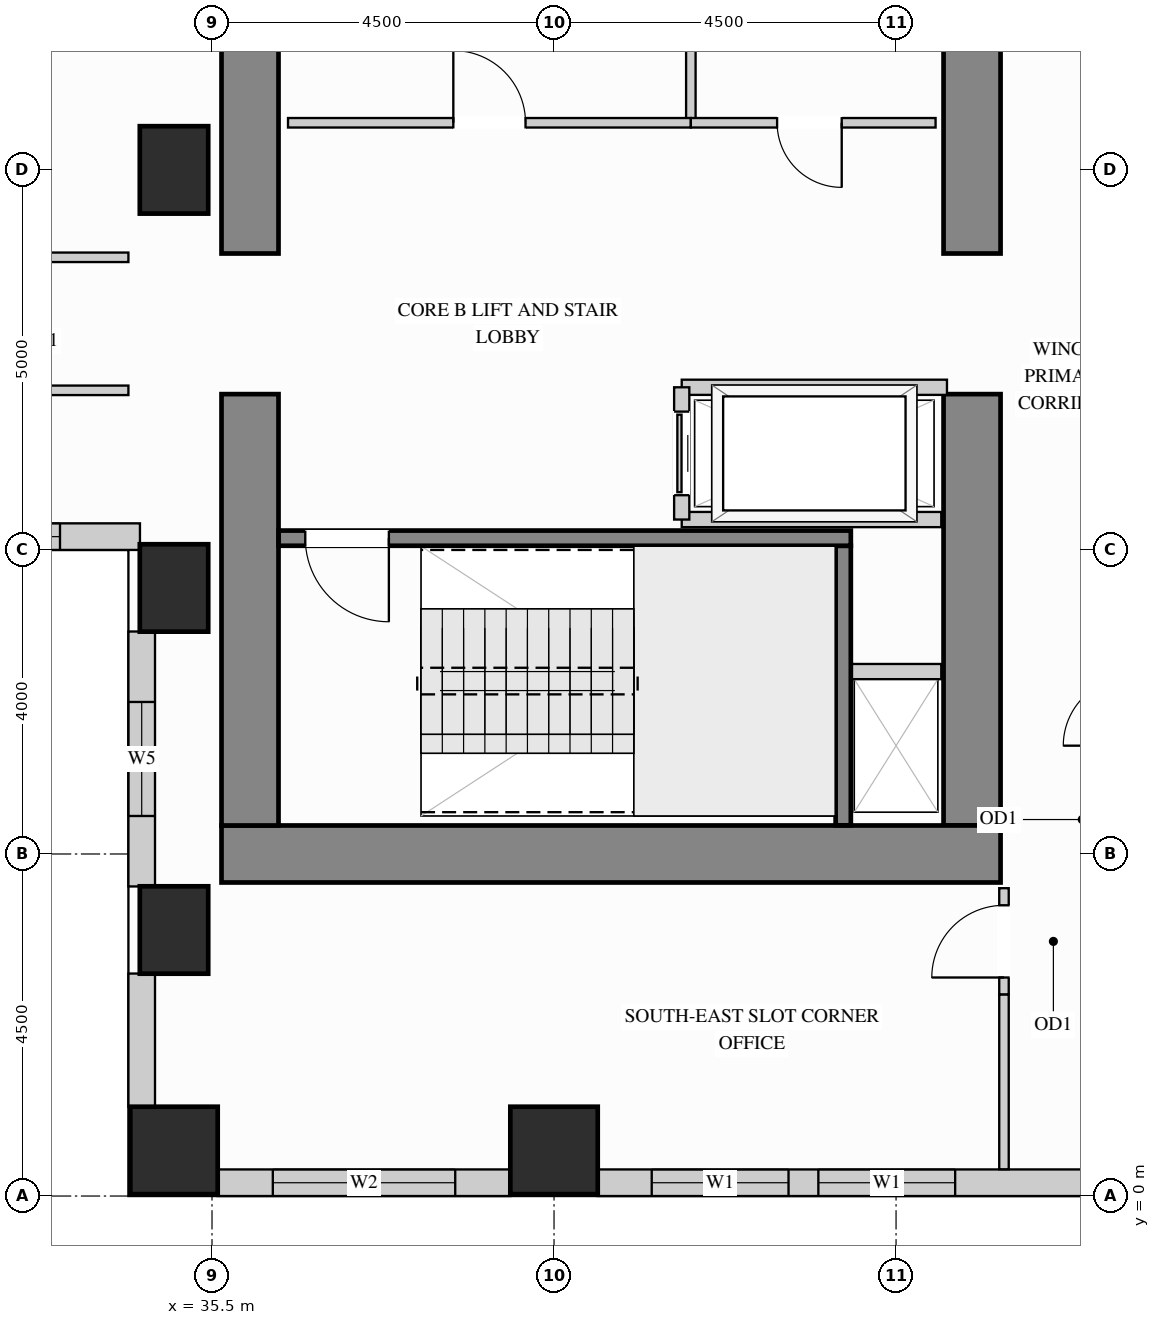
"""IFC4 building model, lengths in metres.
Left out: names, types, materials, properties, quantities, classifications, styles, units other than length and angle.
Written with IfcOpenShell. Run it as: python <this file> out.ifc"""

import sys

from ifc_helpers import new_model, si_unit, direction, frame, frame_2d, origin, origin_2d, place, context, subcontext, project, spatial, rectangle, extrude, source, transform, mapped, element, fill, save


model = new_model("IFC4")
c1 = context("Model", 3, precision=1e-05, world=origin(), true_north=direction((0.0, 1.0)))
c2 = subcontext(c1, "Body", "Model", "MODEL_VIEW")
j1 = project(units=[si_unit("LENGTHUNIT", "METRE"), si_unit("PLANEANGLEUNIT", "RADIAN")], contexts=[c1])
p1 = place(None, origin())
s1 = spatial("IfcSite", under=j1, at=p1, CompositionType="ELEMENT")
p2 = place(p1, origin())
s2 = spatial("IfcBuilding", under=s1, at=p2, CompositionType="ELEMENT")
p3 = place(p2, frame((0.0, 0.0, 120.6)))
s3 = spatial("IfcBuildingStorey", under=s2, at=p3, CompositionType="ELEMENT", Elevation=120.6)
m1 = source(origin(), c2, "Body", "SweptSolid", [
    extrude(rectangle(XDim=0.9, YDim=1.15, at=origin_2d()), origin(), (0.0, 0.0, 1.0), 3.38),
])
for number, where, z_axis, x_axis in (
    (1, (35.0, 13.5, 0.0), (0.0, 0.0, 1.0), (1.0, 0.0, 0.0)),
    (2, (35.0, 3.5, 0.0), (0.0, 0.0, 1.0), (1.0, 0.0, 0.0)),
    (3, (35.0, 8.0, 0.0), (0.0, 0.0, 1.0), (1.0, 0.0, 0.0)),
):
    element("IfcColumn", number, at=place(p3, frame(where, z_axis=z_axis, x_axis=x_axis)), inside=s3, PredefinedType="COLUMN", context=c2, shape_type="MappedRepresentation", body=[
        mapped(m1, transform((0.0, 0.0, 0.0), x_axis=(1.0, 0.0, 0.0), y_axis=(0.0, 1.0, 0.0), z_axis=(0.0, 0.0, 1.0))),
    ])
m2 = source(origin(), c2, "Body", "SweptSolid", [
    extrude(rectangle(XDim=1.15, YDim=1.15, at=origin_2d()), origin(), (0.0, 0.0, 1.0), 3.38),
])
for number, where, z_axis, x_axis in (
    (4, (35.0, 0.6, 0.0), (0.0, 0.0, 1.0), (1.0, 0.0, 0.0)),
    (5, (40.0, 0.6, 0.0), (0.0, 0.0, 1.0), (1.0, 0.0, 0.0)),
):
    element("IfcColumn", number, at=place(p3, frame(where, z_axis=z_axis, x_axis=x_axis)), inside=s3, PredefinedType="COLUMN", context=c2, shape_type="MappedRepresentation", body=[
        mapped(m2, transform((0.0, 0.0, 0.0), x_axis=(1.0, 0.0, 0.0), y_axis=(0.0, 1.0, 0.0), z_axis=(0.0, 0.0, 1.0))),
    ])
m3 = source(origin(), c2, "Body", "SweptSolid", [
    extrude(rectangle(XDim=5.675, YDim=0.75, at=frame_2d((2.837, 0.0))), origin(), (0.0, 0.0, 1.0), 3.38),
])
p4 = place(p3, frame((45.5, 4.875, 0.0), z_axis=(0.0, 0.0, 1.0), x_axis=(0.0, 1.0, 0.0)))
e6 = element("IfcWall", 6, at=p4, inside=s3, PredefinedType="SHEAR", context=c2, shape_type="MappedRepresentation", body=[
    mapped(m3, transform((0.0, 0.0, 0.0), x_axis=(1.0, 0.0, 0.0), y_axis=(0.0, 1.0, 0.0), z_axis=(0.0, 0.0, 1.0))),
])
m4 = source(origin(), c2, "Body", "SweptSolid", [
    extrude(rectangle(XDim=3.725, YDim=0.75, at=frame_2d((1.863, 0.0))), origin(), (0.0, 0.0, 1.0), 3.38),
])
p5 = place(p3, frame((45.5, 12.4, 0.0), z_axis=(0.0, 0.0, 1.0), x_axis=(0.0, 1.0, 0.0)))
e7 = element("IfcWall", 7, at=p5, inside=s3, PredefinedType="SHEAR", context=c2, shape_type="MappedRepresentation", body=[
    mapped(m4, transform((0.0, 0.0, 0.0), x_axis=(1.0, 0.0, 0.0), y_axis=(0.0, 1.0, 0.0), z_axis=(0.0, 0.0, 1.0))),
])
m5 = source(origin(), c2, "Body", "SweptSolid", [
    extrude(rectangle(XDim=10.25, YDim=0.75, at=frame_2d((5.125, 0.0))), origin(), (0.0, 0.0, 1.0), 3.38),
])
p6 = place(p3, frame((35.625, 4.5, 0.0), z_axis=(0.0, 0.0, 1.0), x_axis=(1.0, 0.0, 0.0)))
e8 = element("IfcWall", 8, at=p6, inside=s3, PredefinedType="SHEAR", context=c2, shape_type="MappedRepresentation", body=[
    mapped(m5, transform((0.0, 0.0, 0.0), x_axis=(1.0, 0.0, 0.0), y_axis=(0.0, 1.0, 0.0), z_axis=(0.0, 0.0, 1.0))),
])
p7 = place(p3, frame((36.0, 4.875, 0.0), z_axis=(0.0, 0.0, 1.0), x_axis=(0.0, 1.0, 0.0)))
e9 = element("IfcWall", 9, at=p7, inside=s3, PredefinedType="SHEAR", context=c2, shape_type="MappedRepresentation", body=[
    mapped(m3, transform((0.0, 0.0, 0.0), x_axis=(1.0, 0.0, 0.0), y_axis=(0.0, 1.0, 0.0), z_axis=(0.0, 0.0, 1.0))),
])
p8 = place(p3, frame((36.0, 12.4, 0.0), z_axis=(0.0, 0.0, 1.0), x_axis=(0.0, 1.0, 0.0)))
e10 = element("IfcWall", 10, at=p8, inside=s3, PredefinedType="SHEAR", context=c2, shape_type="MappedRepresentation", body=[
    mapped(m4, transform((0.0, 0.0, 0.0), x_axis=(1.0, 0.0, 0.0), y_axis=(0.0, 1.0, 0.0), z_axis=(0.0, 0.0, 1.0))),
])
p9 = place(p3, frame((30.948, 8.675, 0.0), z_axis=(0.0, 0.0, 1.0), x_axis=(1.0, 0.0, 0.0)))
e11 = element("IfcWall", 11, at=p9, inside=s3, PredefinedType="SOLIDWALL", context=c2, shape_type="SweptSolid", body=[
    extrude(rectangle(XDim=3.604, YDim=0.35, at=frame_2d((1.802, 0.0))), origin(), (0.0, 0.0, 1.0), 3.365),
])
p10 = place(p9, frame((1.052, 0.0, 0.78)))
e12 = element("IfcOpeningElement", 12, at=p10, cuts=e11, PredefinedType="OPENING", context=c2, shape_type="SweptSolid", body=[
    extrude(rectangle(XDim=1.5, YDim=2.0, at=frame_2d((0.75, 1.0))), frame((0.0, 0.185, 0.0), z_axis=(0.0, -1.0, 0.0), x_axis=(1.0, 0.0, 0.0)), (0.0, 0.0, 1.0), 0.37),
])
p11 = place(p3, frame((34.575, 7.427, 0.0), z_axis=(0.0, 0.0, 1.0), x_axis=(0.0, -1.0, 0.0)))
e13 = element("IfcWall", 13, at=p11, inside=s3, PredefinedType="SOLIDWALL", context=c2, shape_type="SweptSolid", body=[
    extrude(rectangle(XDim=3.354, YDim=0.35, at=frame_2d((1.677, 0.0))), origin(), (0.0, 0.0, 1.0), 3.365),
])
p12 = place(p11, frame((0.927, 0.0, 0.78)))
e14 = element("IfcOpeningElement", 14, at=p12, cuts=e13, PredefinedType="OPENING", context=c2, shape_type="SweptSolid", body=[
    extrude(rectangle(XDim=1.5, YDim=2.0, at=frame_2d((0.75, 1.0))), frame((0.0, 0.185, 0.0), z_axis=(0.0, -1.0, 0.0), x_axis=(1.0, 0.0, 0.0)), (0.0, 0.0, 1.0), 0.37),
])
m6 = source(origin(), c2, "Body", "SweptSolid", [
    extrude(rectangle(XDim=1.754, YDim=0.35, at=frame_2d((0.877, 0.0))), origin(), (0.0, 0.0, 1.0), 3.365),
])
p13 = place(p3, frame((34.575, 2.927, 0.0), z_axis=(0.0, 0.0, 1.0), x_axis=(0.0, -1.0, 0.0)))
e15 = element("IfcWall", 15, at=p13, inside=s3, PredefinedType="SOLIDWALL", context=c2, shape_type="MappedRepresentation", body=[
    mapped(m6, transform((0.0, 0.0, 0.0), x_axis=(1.0, 0.0, 0.0), y_axis=(0.0, 1.0, 0.0), z_axis=(0.0, 0.0, 1.0))),
])
p14 = place(p3, frame((35.573, 0.175, 0.0), z_axis=(0.0, 0.0, 1.0), x_axis=(1.0, 0.0, 0.0)))
e16 = element("IfcWall", 16, at=p14, inside=s3, PredefinedType="SOLIDWALL", context=c2, shape_type="SweptSolid", body=[
    extrude(rectangle(XDim=3.854, YDim=0.35, at=frame_2d((1.927, 0.0))), origin(), (0.0, 0.0, 1.0), 3.365),
])
p15 = place(p14, frame((0.727, 0.0, 0.78)))
e17 = element("IfcOpeningElement", 17, at=p15, cuts=e16, PredefinedType="OPENING", context=c2, shape_type="SweptSolid", body=[
    extrude(rectangle(XDim=2.4, YDim=2.1, at=frame_2d((1.2, 1.05))), frame((0.0, 0.185, 0.0), z_axis=(0.0, -1.0, 0.0), x_axis=(1.0, 0.0, 0.0)), (0.0, 0.0, 1.0), 0.37),
])
p16 = place(p3, frame((40.573, 0.175, 0.0), z_axis=(0.0, 0.0, 1.0), x_axis=(1.0, 0.0, 0.0)))
e18 = element("IfcWall", 18, at=p16, inside=s3, PredefinedType="SOLIDWALL", context=c2, shape_type="SweptSolid", body=[
    extrude(rectangle(XDim=6.454, YDim=0.35, at=frame_2d((3.227, 0.0))), origin(), (0.0, 0.0, 1.0), 3.365),
])
p17 = place(p16, frame((0.712, 0.0, 0.78)))
e19 = element("IfcOpeningElement", 19, at=p17, cuts=e18, PredefinedType="OPENING", context=c2, shape_type="SweptSolid", body=[
    extrude(rectangle(XDim=1.8, YDim=2.1, at=frame_2d((0.9, 1.05))), frame((0.0, 0.185, 0.0), z_axis=(0.0, -1.0, 0.0), x_axis=(1.0, 0.0, 0.0)), (0.0, 0.0, 1.0), 0.37),
])
p18 = place(p16, frame((2.905, 0.0, 0.78)))
e20 = element("IfcOpeningElement", 20, at=p18, cuts=e18, PredefinedType="OPENING", context=c2, shape_type="SweptSolid", body=[
    extrude(rectangle(XDim=1.8, YDim=2.1, at=frame_2d((0.9, 1.05))), frame((0.0, 0.185, 0.0), z_axis=(0.0, -1.0, 0.0), x_axis=(1.0, 0.0, 0.0)), (0.0, 0.0, 1.0), 0.37),
])
m7 = source(origin(), c2, "Body", "SweptSolid", [
    extrude(rectangle(XDim=1.93, YDim=0.125, at=frame_2d((0.965, 0.0))), origin(), (0.0, 0.0, 1.0), 3.365),
])
p19 = place(p3, frame((41.8, 14.12, 0.0), z_axis=(0.0, 0.0, 1.0), x_axis=(0.0, 1.0, 0.0)))
e21 = element("IfcWall", 21, at=p19, inside=s3, PredefinedType="PARTITIONING", context=c2, shape_type="MappedRepresentation", body=[
    mapped(m7, transform((0.0, 0.0, 0.0), x_axis=(1.0, 0.0, 0.0), y_axis=(0.0, 1.0, 0.0), z_axis=(0.0, 0.0, 1.0))),
])
p20 = place(p3, frame((36.5, 14.12, 0.0), z_axis=(0.0, 0.0, 1.0), x_axis=(1.0, 0.0, 0.0)))
e22 = element("IfcWall", 22, at=p20, inside=s3, PredefinedType="PARTITIONING", context=c2, shape_type="SweptSolid", body=[
    extrude(rectangle(XDim=5.3, YDim=0.125, at=frame_2d((2.65, 0.0))), origin(), (0.0, 0.0, 1.0), 3.365),
])
p21 = place(p20, frame((2.175, 0.0, 0.0)))
e23 = element("IfcOpeningElement", 23, at=p21, cuts=e22, PredefinedType="OPENING", context=c2, shape_type="SweptSolid", body=[
    extrude(rectangle(XDim=0.95, YDim=2.15, at=frame_2d((0.475, 1.075))), frame((0.0, 0.073, 0.0), z_axis=(0.0, -1.0, 0.0), x_axis=(1.0, 0.0, 0.0)), (0.0, 0.0, 1.0), 0.145),
])
p22 = place(p3, frame((41.8, 14.12, 0.0), z_axis=(0.0, 0.0, 1.0), x_axis=(1.0, 0.0, 0.0)))
e24 = element("IfcWall", 24, at=p22, inside=s3, PredefinedType="PARTITIONING", context=c2, shape_type="SweptSolid", body=[
    extrude(rectangle(XDim=3.22, YDim=0.125, at=frame_2d((1.61, 0.0))), origin(), (0.0, 0.0, 1.0), 3.365),
])
p23 = place(p22, frame((1.135, 0.0, 0.0)))
e25 = element("IfcOpeningElement", 25, at=p23, cuts=e24, PredefinedType="OPENING", context=c2, shape_type="SweptSolid", body=[
    extrude(rectangle(XDim=0.85, YDim=2.1, at=frame_2d((0.425, 1.05))), frame((0.0, 0.073, 0.0), z_axis=(0.0, -1.0, 0.0), x_axis=(1.0, 0.0, 0.0)), (0.0, 0.0, 1.0), 0.145),
])
p24 = place(p3, frame((45.92, 2.65, 0.0), z_axis=(0.0, 0.0, 1.0), x_axis=(0.0, 1.0, 0.0)))
e26 = element("IfcWall", 26, at=p24, inside=s3, PredefinedType="PARTITIONING", context=c2, shape_type="SweptSolid", body=[
    extrude(rectangle(XDim=1.4, YDim=0.125, at=frame_2d((0.7, 0.0))), origin(), (0.0, 0.0, 1.0), 3.365),
])
p25 = place(p24, frame((0.225, 0.0, 0.0)))
e27 = element("IfcOpeningElement", 27, at=p25, cuts=e26, PredefinedType="OPENING", context=c2, shape_type="SweptSolid", body=[
    extrude(rectangle(XDim=0.95, YDim=2.15, at=frame_2d((0.475, 1.075))), frame((0.0, 0.073, 0.0), z_axis=(0.0, -1.0, 0.0), x_axis=(1.0, 0.0, 0.0)), (0.0, 0.0, 1.0), 0.145),
])
m8 = source(origin(), c2, "Body", "SweptSolid", [
    extrude(rectangle(XDim=2.298, YDim=0.125, at=frame_2d((1.149, 0.0))), origin(), (0.0, 0.0, 1.0), 3.365),
])
p26 = place(p3, frame((45.92, 0.352, 0.0), z_axis=(0.0, 0.0, 1.0), x_axis=(0.0, 1.0, 0.0)))
e28 = element("IfcWall", 28, at=p26, inside=s3, PredefinedType="PARTITIONING", context=c2, shape_type="MappedRepresentation", body=[
    mapped(m8, transform((0.0, 0.0, 0.0), x_axis=(1.0, 0.0, 0.0), y_axis=(0.0, 1.0, 0.0), z_axis=(0.0, 0.0, 1.0))),
])
p27 = place(p3, frame((29.85, 12.35, 0.0), z_axis=(0.0, 0.0, 1.0), x_axis=(1.0, 0.0, 0.0)))
e29 = element("IfcWall", 29, at=p27, inside=s3, PredefinedType="PARTITIONING", context=c2, shape_type="SweptSolid", body=[
    extrude(rectangle(XDim=4.55, YDim=0.125, at=frame_2d((2.275, 0.0))), origin(), (0.0, 0.0, 1.0), 3.365),
])
p28 = place(p27, frame((1.8, 0.0, 0.0)))
e30 = element("IfcOpeningElement", 30, at=p28, cuts=e29, PredefinedType="OPENING", context=c2, shape_type="SweptSolid", body=[
    extrude(rectangle(XDim=0.95, YDim=2.15, at=frame_2d((0.475, 1.075))), frame((0.0, 0.073, 0.0), z_axis=(0.0, -1.0, 0.0), x_axis=(1.0, 0.0, 0.0)), (0.0, 0.0, 1.0), 0.145),
])
p29 = place(p3, frame((29.85, 10.6, 0.0), z_axis=(0.0, 0.0, 1.0), x_axis=(1.0, 0.0, 0.0)))
e31 = element("IfcWall", 31, at=p29, inside=s3, PredefinedType="PARTITIONING", context=c2, shape_type="SweptSolid", body=[
    extrude(rectangle(XDim=4.55, YDim=0.125, at=frame_2d((2.275, 0.0))), origin(), (0.0, 0.0, 1.0), 3.365),
])
p30 = place(p29, frame((1.8, 0.0, 0.0)))
e32 = element("IfcOpeningElement", 32, at=p30, cuts=e31, PredefinedType="OPENING", context=c2, shape_type="SweptSolid", body=[
    extrude(rectangle(XDim=0.95, YDim=2.15, at=frame_2d((0.475, 1.075))), frame((0.0, 0.073, 0.0), z_axis=(0.0, -1.0, 0.0), x_axis=(1.0, 0.0, 0.0)), (0.0, 0.0, 1.0), 0.145),
])
m9 = source(origin(), c2, "Body", "SweptSolid", [
    extrude(rectangle(XDim=1.245, YDim=0.2, at=frame_2d((0.623, 0.0))), origin(), (0.0, 0.0, 1.0), 3.365),
])
p31 = place(p3, frame((43.85, 6.9, 0.0), z_axis=(0.0, 0.0, 1.0), x_axis=(1.0, 0.0, 0.0)))
e33 = element("IfcWall", 33, at=p31, inside=s3, PredefinedType="PARTITIONING", context=c2, shape_type="MappedRepresentation", body=[
    mapped(m9, transform((0.0, 0.0, 0.0), x_axis=(1.0, 0.0, 0.0), y_axis=(0.0, 1.0, 0.0), z_axis=(0.0, 0.0, 1.0))),
])
m10 = source(origin(), c2, "Body", "SweptSolid", [
    extrude(rectangle(XDim=3.49, YDim=0.2, at=frame_2d((1.745, 0.0))), origin(), (0.0, 0.0, 1.0), 3.365),
])
p32 = place(p3, frame((41.68, 10.64, 0.0), z_axis=(0.0, 0.0, 1.0), x_axis=(1.0, 0.0, 0.0)))
e34 = element("IfcWall", 34, at=p32, inside=s3, PredefinedType="PARTITIONING", context=c2, shape_type="MappedRepresentation", body=[
    mapped(m10, transform((0.0, 0.0, 0.0), x_axis=(1.0, 0.0, 0.0), y_axis=(0.0, 1.0, 0.0), z_axis=(0.0, 0.0, 1.0))),
])
m11 = source(origin(), c2, "Body", "SweptSolid", [
    extrude(rectangle(XDim=3.415, YDim=0.2, at=frame_2d((1.708, 0.0))), origin(), (0.0, 0.0, 1.0), 3.365),
])
p33 = place(p3, frame((41.68, 8.9, 0.0), z_axis=(0.0, 0.0, 1.0), x_axis=(1.0, 0.0, 0.0)))
e35 = element("IfcWall", 35, at=p33, inside=s3, PredefinedType="PARTITIONING", context=c2, shape_type="MappedRepresentation", body=[
    mapped(m11, transform((0.0, 0.0, 0.0), x_axis=(1.0, 0.0, 0.0), y_axis=(0.0, 1.0, 0.0), z_axis=(0.0, 0.0, 1.0))),
])
p34 = place(p3, frame((41.68, 8.9, 0.0), z_axis=(0.0, 0.0, 1.0), x_axis=(0.0, 1.0, 0.0)))
e36 = element("IfcWall", 36, at=p34, inside=s3, PredefinedType="PARTITIONING", context=c2, shape_type="SweptSolid", body=[
    extrude(rectangle(XDim=1.74, YDim=0.2, at=frame_2d((0.87, 0.0))), origin(), (0.0, 0.0, 1.0), 3.365),
])
p35 = place(p34, frame((0.32, 0.0, 0.0)))
e37 = element("IfcOpeningElement", 37, at=p35, cuts=e36, PredefinedType="OPENING", context=c2, shape_type="SweptSolid", body=[
    extrude(rectangle(XDim=1.1, YDim=2.2, at=frame_2d((0.55, 1.1))), frame((0.0, 0.11, 0.0), z_axis=(0.0, -1.0, 0.0), x_axis=(1.0, 0.0, 0.0)), (0.0, 0.0, 1.0), 0.22),
])
m12 = source(origin(), c2, "Body", "SweptSolid", [
    extrude(rectangle(XDim=3.678, YDim=0.2, at=frame_2d((1.839, 0.0))), origin(), (0.0, 0.0, 1.0), 3.38),
])
p36 = place(p3, frame((43.805, 4.877, 0.0), z_axis=(0.0, 0.0, 1.0), x_axis=(0.0, 1.0, 0.0)))
e38 = element("IfcWall", 38, at=p36, inside=s3, PredefinedType="SHEAR", context=c2, shape_type="MappedRepresentation", body=[
    mapped(m12, transform((0.0, 0.0, 0.0), x_axis=(1.0, 0.0, 0.0), y_axis=(0.0, 1.0, 0.0), z_axis=(0.0, 0.0, 1.0))),
])
p37 = place(p3, frame((36.377, 8.655, 0.0), z_axis=(0.0, 0.0, 1.0), x_axis=(1.0, 0.0, 0.0)))
e39 = element("IfcWall", 39, at=p37, inside=s3, PredefinedType="SHEAR", context=c2, shape_type="SweptSolid", body=[
    extrude(rectangle(XDim=7.528, YDim=0.2, at=frame_2d((3.764, 0.0))), origin(), (0.0, 0.0, 1.0), 3.38),
])
p38 = place(p37, frame((0.35, 0.0, 0.0)))
e40 = element("IfcOpeningElement", 40, at=p38, cuts=e39, PredefinedType="OPENING", context=c2, shape_type="SweptSolid", body=[
    extrude(rectangle(XDim=1.1, YDim=2.15, at=frame_2d((0.55, 1.075))), frame((0.0, 0.11, 0.0), z_axis=(0.0, -1.0, 0.0), x_axis=(1.0, 0.0, 0.0)), (0.0, 0.0, 1.0), 0.22),
])
m13 = source(origin(), c2, "Body", "SweptSolid", [
    extrude(rectangle(XDim=1.1, YDim=2.2, at=frame_2d((0.55, 1.1))), frame((0.0, 0.025, 0.0), z_axis=(0.0, -1.0, 0.0), x_axis=(1.0, 0.0, 0.0)), (0.0, 0.0, 1.0), 0.05),
])
p39 = place(p35, origin())
e41 = element("IfcDoor", 41, at=p39, inside=s3, OperationType="SLIDING_TO_LEFT", PredefinedType="DOOR", context=c2, shape_type="MappedRepresentation", body=[
    mapped(m13, transform((0.0, 0.0, 0.0), x_axis=(1.0, 0.0, 0.0), y_axis=(0.0, 1.0, 0.0), z_axis=(0.0, 0.0, 1.0))),
])
fill(e37, e41)
m14 = source(origin(), c2, "Body", "SweptSolid", [
    extrude(rectangle(XDim=0.95, YDim=2.15, at=frame_2d((0.475, 1.075))), frame((0.0, 0.025, 0.0), z_axis=(0.0, -1.0, 0.0), x_axis=(1.0, 0.0, 0.0)), (0.0, 0.0, 1.0), 0.05),
])
p40 = place(p21, origin())
e42 = element("IfcDoor", 42, at=p40, inside=s3, OperationType="SINGLE_SWING_LEFT", PredefinedType="DOOR", context=c2, shape_type="MappedRepresentation", body=[
    mapped(m14, transform((0.0, 0.0, 0.0), x_axis=(1.0, 0.0, 0.0), y_axis=(0.0, 1.0, 0.0), z_axis=(0.0, 0.0, 1.0))),
])
fill(e23, e42)
p41 = place(p25, origin())
e43 = element("IfcDoor", 43, at=p41, inside=s3, OperationType="SINGLE_SWING_LEFT", PredefinedType="DOOR", context=c2, shape_type="MappedRepresentation", body=[
    mapped(m14, transform((0.0, 0.0, 0.0), x_axis=(1.0, 0.0, 0.0), y_axis=(0.0, 1.0, 0.0), z_axis=(0.0, 0.0, 1.0))),
])
fill(e27, e43)
m15 = source(origin(), c2, "Body", "SweptSolid", [
    extrude(rectangle(XDim=0.85, YDim=2.1, at=frame_2d((0.425, 1.05))), frame((0.0, 0.025, 0.0), z_axis=(0.0, -1.0, 0.0), x_axis=(1.0, 0.0, 0.0)), (0.0, 0.0, 1.0), 0.05),
])
p42 = place(p23, origin())
e44 = element("IfcDoor", 44, at=p42, inside=s3, OperationType="SINGLE_SWING_RIGHT", PredefinedType="DOOR", context=c2, shape_type="MappedRepresentation", body=[
    mapped(m15, transform((0.0, 0.0, 0.0), x_axis=(1.0, 0.0, 0.0), y_axis=(0.0, 1.0, 0.0), z_axis=(0.0, 0.0, 1.0))),
])
fill(e25, e44)
m16 = source(origin(), c2, "Body", "SweptSolid", [
    extrude(rectangle(XDim=1.1, YDim=2.15, at=frame_2d((0.55, 1.075))), frame((0.0, 0.025, 0.0), z_axis=(0.0, -1.0, 0.0), x_axis=(1.0, 0.0, 0.0)), (0.0, 0.0, 1.0), 0.05),
])
p43 = place(p38, origin())
e45 = element("IfcDoor", 45, at=p43, inside=s3, OperationType="SINGLE_SWING_RIGHT", PredefinedType="DOOR", context=c2, shape_type="MappedRepresentation", body=[
    mapped(m16, transform((0.0, 0.0, 0.0), x_axis=(1.0, 0.0, 0.0), y_axis=(0.0, 1.0, 0.0), z_axis=(0.0, 0.0, 1.0))),
])
fill(e40, e45)
m17 = source(origin(), c2, "Body", "SweptSolid", [
    extrude(rectangle(XDim=1.8, YDim=2.1, at=frame_2d((0.9, 1.05))), frame((0.0, 0.03, 0.0), z_axis=(0.0, -1.0, 0.0), x_axis=(1.0, 0.0, 0.0)), (0.0, 0.0, 1.0), 0.06),
])
p44 = place(p17, origin())
e46 = element("IfcWindow", 46, at=p44, inside=s3, PartitioningType="SINGLE_PANEL", PredefinedType="WINDOW", context=c2, shape_type="MappedRepresentation", body=[
    mapped(m17, transform((0.0, 0.0, 0.0), x_axis=(1.0, 0.0, 0.0), y_axis=(0.0, 1.0, 0.0), z_axis=(0.0, 0.0, 1.0))),
])
fill(e19, e46)
p45 = place(p18, origin())
e47 = element("IfcWindow", 47, at=p45, inside=s3, PartitioningType="SINGLE_PANEL", PredefinedType="WINDOW", context=c2, shape_type="MappedRepresentation", body=[
    mapped(m17, transform((0.0, 0.0, 0.0), x_axis=(1.0, 0.0, 0.0), y_axis=(0.0, 1.0, 0.0), z_axis=(0.0, 0.0, 1.0))),
])
fill(e20, e47)
m18 = source(origin(), c2, "Body", "SweptSolid", [
    extrude(rectangle(XDim=2.4, YDim=2.1, at=frame_2d((1.2, 1.05))), frame((0.0, 0.03, 0.0), z_axis=(0.0, -1.0, 0.0), x_axis=(1.0, 0.0, 0.0)), (0.0, 0.0, 1.0), 0.06),
])
p46 = place(p15, origin())
e48 = element("IfcWindow", 48, at=p46, inside=s3, PartitioningType="SINGLE_PANEL", PredefinedType="WINDOW", context=c2, shape_type="MappedRepresentation", body=[
    mapped(m18, transform((0.0, 0.0, 0.0), x_axis=(1.0, 0.0, 0.0), y_axis=(0.0, 1.0, 0.0), z_axis=(0.0, 0.0, 1.0))),
])
fill(e17, e48)
m19 = source(origin(), c2, "Body", "SweptSolid", [
    extrude(rectangle(XDim=1.5, YDim=2.0, at=frame_2d((0.75, 1.0))), frame((0.0, 0.03, 0.0), z_axis=(0.0, -1.0, 0.0), x_axis=(1.0, 0.0, 0.0)), (0.0, 0.0, 1.0), 0.06),
])
p47 = place(p10, origin())
e49 = element("IfcWindow", 49, at=p47, inside=s3, PartitioningType="SINGLE_PANEL", PredefinedType="WINDOW", context=c2, shape_type="MappedRepresentation", body=[
    mapped(m19, transform((0.0, 0.0, 0.0), x_axis=(1.0, 0.0, 0.0), y_axis=(0.0, 1.0, 0.0), z_axis=(0.0, 0.0, 1.0))),
])
fill(e12, e49)
p48 = place(p12, origin())
e50 = element("IfcWindow", 50, at=p48, inside=s3, PartitioningType="SINGLE_PANEL", PredefinedType="WINDOW", context=c2, shape_type="MappedRepresentation", body=[
    mapped(m19, transform((0.0, 0.0, 0.0), x_axis=(1.0, 0.0, 0.0), y_axis=(0.0, 1.0, 0.0), z_axis=(0.0, 0.0, 1.0))),
])
fill(e14, e50)
save(model, sys.argv[1])
